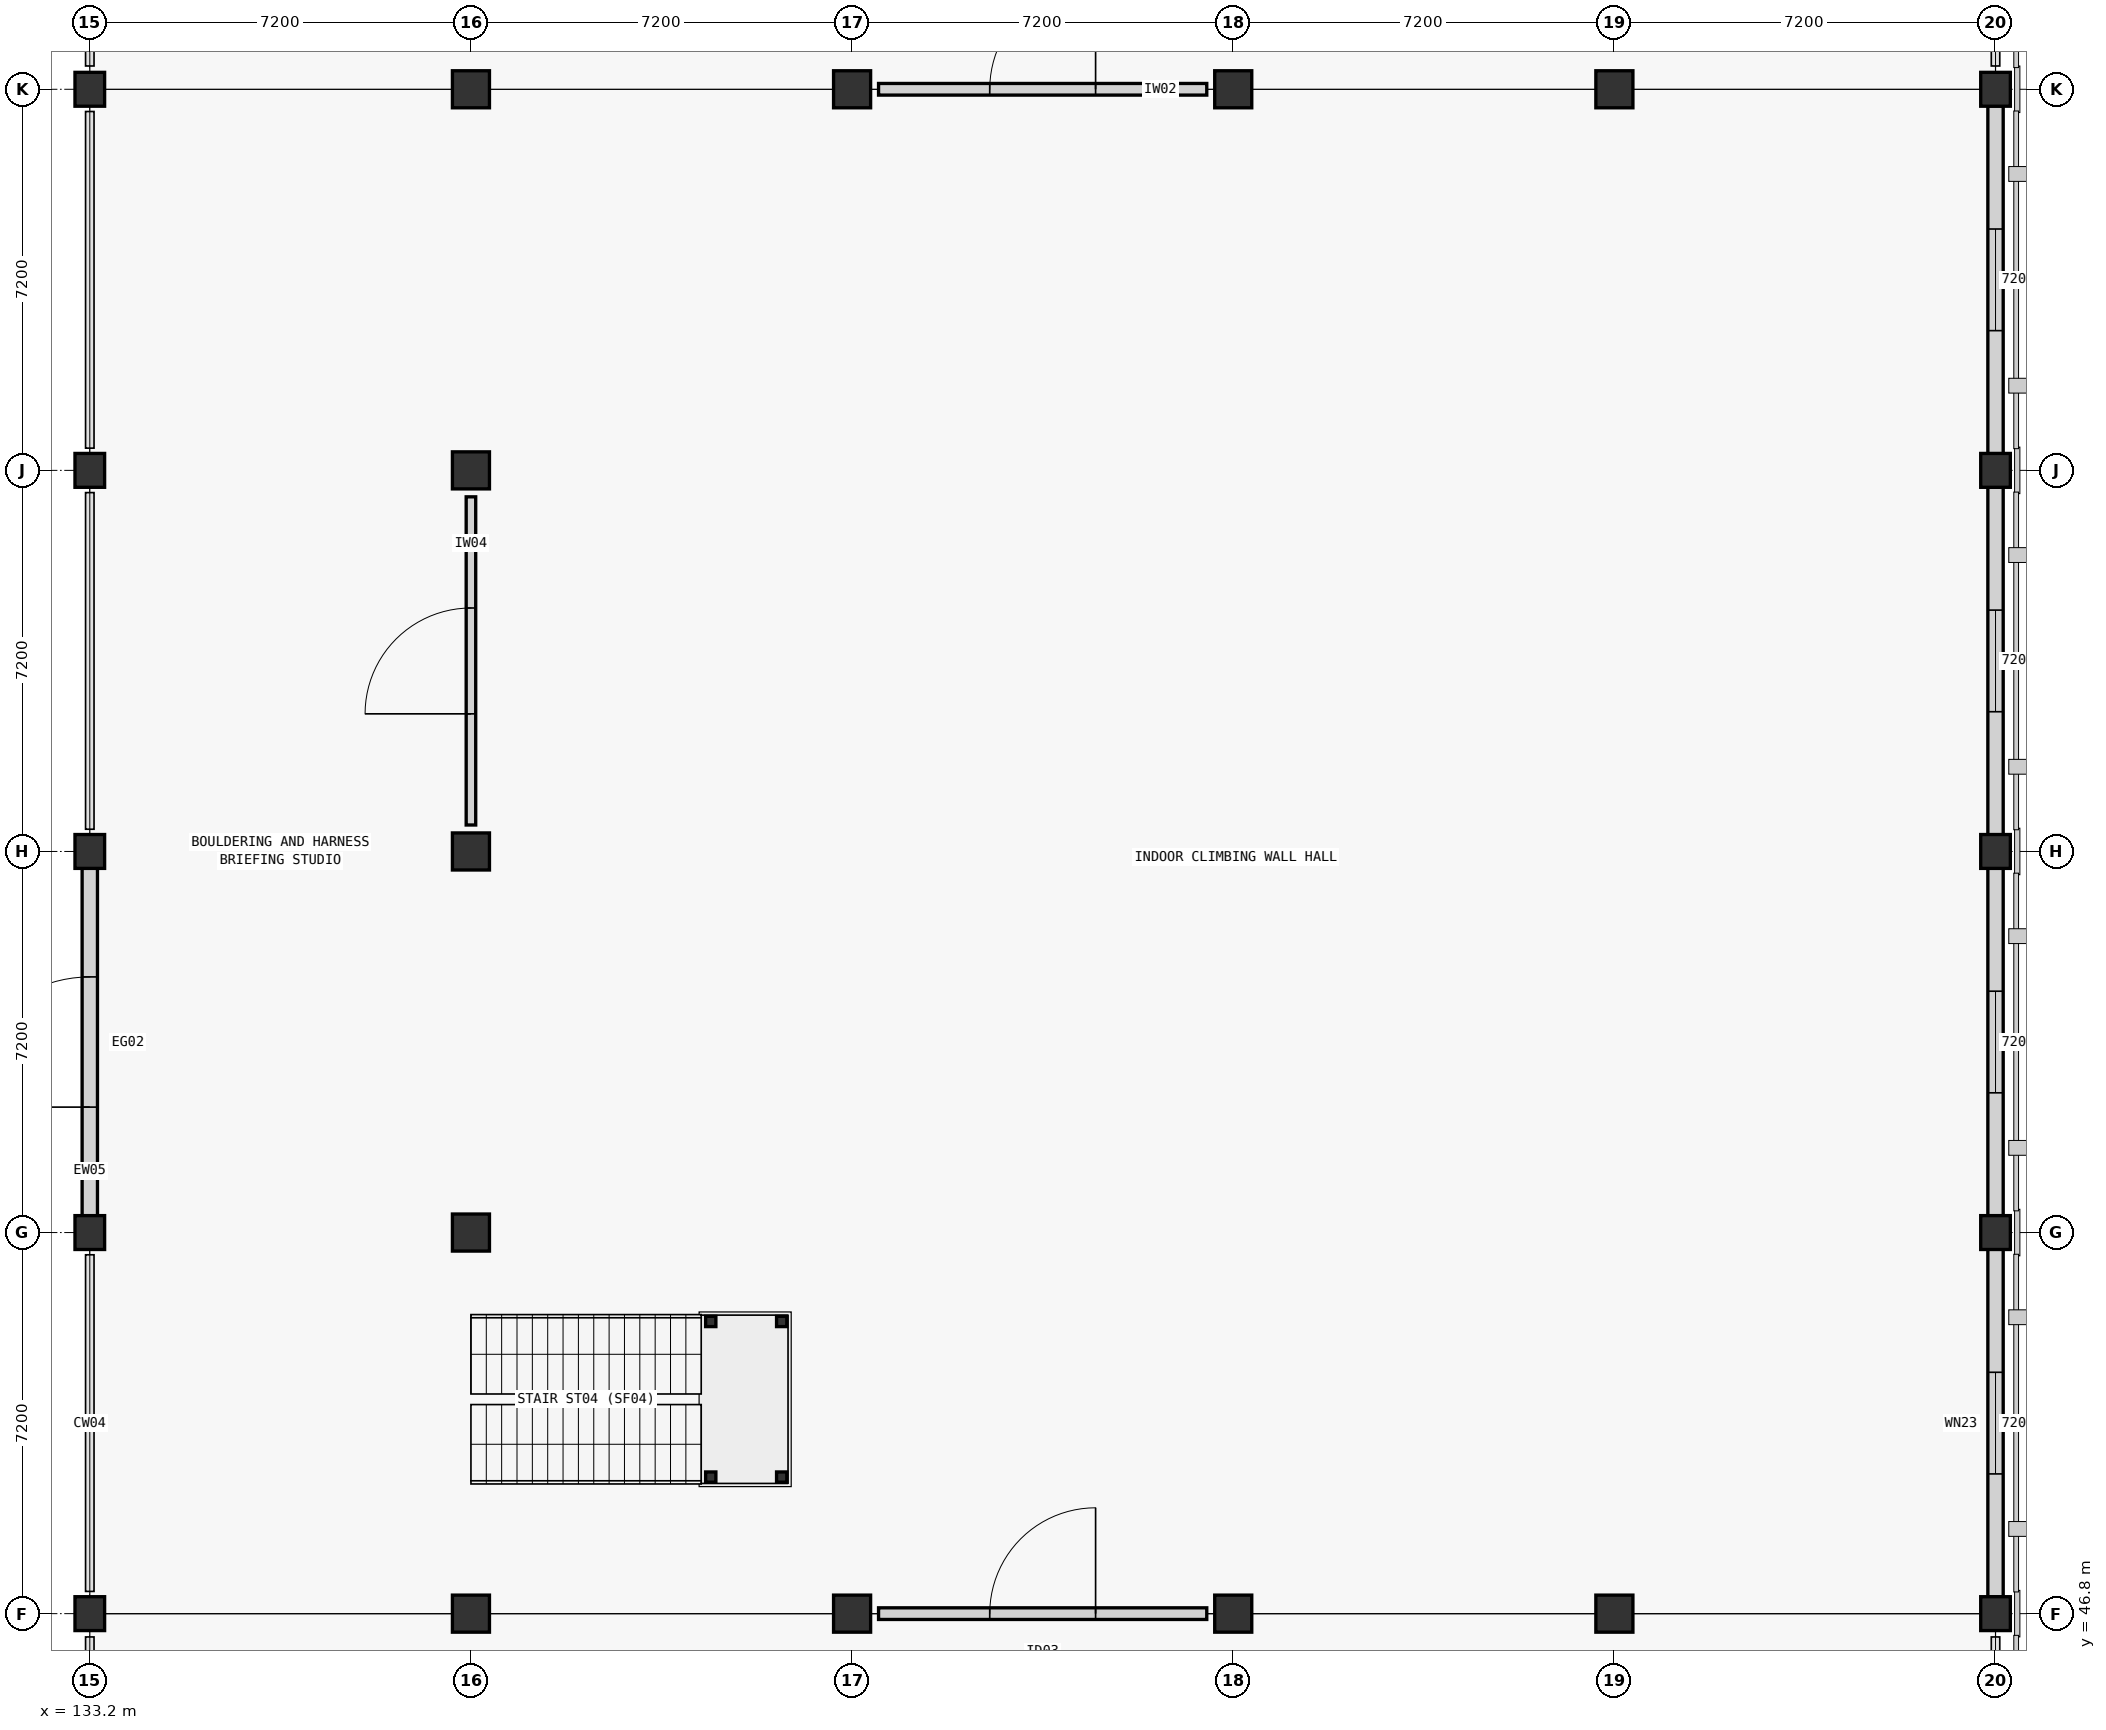
"""IFC4 building model, lengths in metres.
Left out: names, types, materials, properties, quantities, classifications, styles, units other than length and angle.
Written with IfcOpenShell. Run it as: python <this file> out.ifc"""

import sys

from ifc_helpers import new_model, si_unit, direction, frame, frame_2d, origin, origin_2d, place, context, subcontext, project, spatial, rectangle, hollow_circle, extrude, element, fill, save


model = new_model("IFC4")
c1 = context("Model", 3, precision=1e-05, world=origin(), true_north=direction((0.0, 1.0)))
c2 = subcontext(c1, "Body", "Model", "MODEL_VIEW")
j1 = project(units=[si_unit("LENGTHUNIT", "METRE"), si_unit("PLANEANGLEUNIT", "RADIAN")], contexts=[c1])
p1 = place(None, origin())
s1 = spatial("IfcSite", under=j1, at=p1, CompositionType="ELEMENT")
p2 = place(p1, origin())
s2 = spatial("IfcBuilding", under=s1, at=p2, CompositionType="ELEMENT")
p3 = place(p2, origin())
s3 = spatial("IfcBuildingStorey", under=s2, at=p3, CompositionType="ELEMENT", Elevation=0.0)
for number, where, z_axis, x_axis in (
    (1, (133.2, 46.8, -0.3), (0.0, 0.0, 1.0), (1.0, 0.0, 0.0)),
    (2, (133.2, 54.0, -0.3), (0.0, 0.0, 1.0), (1.0, 0.0, 0.0)),
    (3, (133.2, 61.2, -0.3), (0.0, 0.0, 1.0), (1.0, 0.0, 0.0)),
    (4, (133.2, 68.4, -0.3), (0.0, 0.0, 1.0), (1.0, 0.0, 0.0)),
    (5, (133.2, 75.6, -0.3), (0.0, 0.0, 1.0), (1.0, 0.0, 0.0)),
):
    element("IfcColumn", number, at=place(p3, frame(where, z_axis=z_axis, x_axis=x_axis)), inside=s3, PredefinedType="COLUMN", context=c2, shape_type="SweptSolid", body=[
        extrude(rectangle(XDim=0.56, YDim=0.64, at=origin_2d()), origin(), (0.0, 0.0, 1.0), 5.7),
    ])
for number, where, z_axis, x_axis in (
    (6, (140.4, 46.8, -0.3), (0.0, 0.0, 1.0), (1.0, 0.0, 0.0)),
    (7, (140.4, 54.0, -0.3), (0.0, 0.0, 1.0), (1.0, 0.0, 0.0)),
    (8, (140.4, 61.2, -0.3), (0.0, 0.0, 1.0), (1.0, 0.0, 0.0)),
    (9, (140.4, 68.4, -0.3), (0.0, 0.0, 1.0), (1.0, 0.0, 0.0)),
    (10, (140.4, 75.6, -0.3), (0.0, 0.0, 1.0), (1.0, 0.0, 0.0)),
    (11, (147.6, 46.8, -0.3), (0.0, 0.0, 1.0), (1.0, 0.0, 0.0)),
    (12, (147.6, 75.6, -0.3), (0.0, 0.0, 1.0), (1.0, 0.0, 0.0)),
    (13, (154.8, 46.8, -0.3), (0.0, 0.0, 1.0), (1.0, 0.0, 0.0)),
    (14, (154.8, 75.6, -0.3), (0.0, 0.0, 1.0), (1.0, 0.0, 0.0)),
    (15, (162.0, 46.8, -0.3), (0.0, 0.0, 1.0), (1.0, 0.0, 0.0)),
    (16, (162.0, 75.6, -0.3), (0.0, 0.0, 1.0), (1.0, 0.0, 0.0)),
):
    element("IfcColumn", number, at=place(p3, frame(where, z_axis=z_axis, x_axis=x_axis)), inside=s3, PredefinedType="COLUMN", context=c2, shape_type="SweptSolid", body=[
        extrude(rectangle(XDim=0.7, YDim=0.7, at=origin_2d()), origin(), (0.0, 0.0, 1.0), 5.7),
    ])
for number, where, z_axis, x_axis in (
    (17, (169.2, 46.8, -0.3), (0.0, 0.0, 1.0), (1.0, 0.0, 0.0)),
    (18, (169.2, 54.0, -0.3), (0.0, 0.0, 1.0), (1.0, 0.0, 0.0)),
    (19, (169.2, 61.2, -0.3), (0.0, 0.0, 1.0), (1.0, 0.0, 0.0)),
    (20, (169.2, 68.4, -0.3), (0.0, 0.0, 1.0), (1.0, 0.0, 0.0)),
    (21, (169.2, 75.6, -0.3), (0.0, 0.0, 1.0), (1.0, 0.0, 0.0)),
):
    element("IfcColumn", number, at=place(p3, frame(where, z_axis=z_axis, x_axis=x_axis)), inside=s3, PredefinedType="COLUMN", context=c2, shape_type="SweptSolid", body=[
        extrude(rectangle(XDim=0.56, YDim=0.64, at=origin_2d()), origin(), (0.0, 0.0, 1.0), 5.7),
    ])
p4 = place(p3, frame((169.2, 53.684, 0.0), z_axis=(0.0, 0.0, 1.0), x_axis=(0.0, -1.0, 0.0)))
e22 = element("IfcWall", 22, at=p4, inside=s3, PredefinedType="STANDARD", context=c2, shape_type="SweptSolid", body=[
    extrude(rectangle(XDim=6.568, YDim=0.29, at=frame_2d((3.284, 0.0))), origin(), (0.0, 0.0, 1.0), 4.7),
])
p5 = place(p4, frame((2.324, 0.0, 0.9)))
e23 = element("IfcOpeningElement", 23, at=p5, cuts=e22, PredefinedType="OPENING", context=c2, shape_type="SweptSolid", body=[
    extrude(rectangle(XDim=1.92, YDim=2.62, at=frame_2d((0.96, 1.31))), frame((0.0, 0.145, 0.0), z_axis=(0.0, -1.0, 0.0), x_axis=(1.0, 0.0, 0.0)), (0.0, 0.0, 1.0), 0.29),
])
p6 = place(p3, frame((133.2, 54.316, 0.0), z_axis=(0.0, 0.0, 1.0), x_axis=(0.0, 1.0, 0.0)))
e24 = element("IfcWall", 24, at=p6, inside=s3, PredefinedType="STANDARD", context=c2, shape_type="SweptSolid", body=[
    extrude(rectangle(XDim=6.568, YDim=0.29, at=frame_2d((3.284, 0.0))), origin(), (0.0, 0.0, 1.0), 4.515),
])
p7 = place(p6, frame((2.054, 0.0, 0.0)))
e25 = element("IfcOpeningElement", 25, at=p7, cuts=e24, PredefinedType="OPENING", context=c2, shape_type="SweptSolid", body=[
    extrude(rectangle(XDim=2.46, YDim=2.34, at=frame_2d((1.23, 1.17))), frame((0.0, 0.145, 0.0), z_axis=(0.0, -1.0, 0.0), x_axis=(1.0, 0.0, 0.0)), (0.0, 0.0, 1.0), 0.29),
])
p8 = place(p3, frame((169.2, 60.884, 0.0), z_axis=(0.0, 0.0, 1.0), x_axis=(0.0, -1.0, 0.0)))
e26 = element("IfcWall", 26, at=p8, inside=s3, PredefinedType="STANDARD", context=c2, shape_type="SweptSolid", body=[
    extrude(rectangle(XDim=6.568, YDim=0.29, at=frame_2d((3.284, 0.0))), origin(), (0.0, 0.0, 1.0), 4.7),
])
p9 = place(p8, frame((2.324, 0.0, 0.9)))
e27 = element("IfcOpeningElement", 27, at=p9, cuts=e26, PredefinedType="OPENING", context=c2, shape_type="SweptSolid", body=[
    extrude(rectangle(XDim=1.92, YDim=2.62, at=frame_2d((0.96, 1.31))), frame((0.0, 0.145, 0.0), z_axis=(0.0, -1.0, 0.0), x_axis=(1.0, 0.0, 0.0)), (0.0, 0.0, 1.0), 0.29),
])
p10 = place(p3, frame((169.2, 68.084, 0.0), z_axis=(0.0, 0.0, 1.0), x_axis=(0.0, -1.0, 0.0)))
e28 = element("IfcWall", 28, at=p10, inside=s3, PredefinedType="STANDARD", context=c2, shape_type="SweptSolid", body=[
    extrude(rectangle(XDim=6.568, YDim=0.29, at=frame_2d((3.284, 0.0))), origin(), (0.0, 0.0, 1.0), 4.7),
])
p11 = place(p10, frame((2.324, 0.0, 0.9)))
e29 = element("IfcOpeningElement", 29, at=p11, cuts=e28, PredefinedType="OPENING", context=c2, shape_type="SweptSolid", body=[
    extrude(rectangle(XDim=1.92, YDim=2.62, at=frame_2d((0.96, 1.31))), frame((0.0, 0.145, 0.0), z_axis=(0.0, -1.0, 0.0), x_axis=(1.0, 0.0, 0.0)), (0.0, 0.0, 1.0), 0.29),
])
p12 = place(p3, frame((169.2, 75.284, 0.0), z_axis=(0.0, 0.0, 1.0), x_axis=(0.0, -1.0, 0.0)))
e30 = element("IfcWall", 30, at=p12, inside=s3, PredefinedType="STANDARD", context=c2, shape_type="SweptSolid", body=[
    extrude(rectangle(XDim=6.568, YDim=0.29, at=frame_2d((3.284, 0.0))), origin(), (0.0, 0.0, 1.0), 4.7),
])
p13 = place(p12, frame((2.324, 0.0, 0.9)))
e31 = element("IfcOpeningElement", 31, at=p13, cuts=e30, PredefinedType="OPENING", context=c2, shape_type="SweptSolid", body=[
    extrude(rectangle(XDim=1.92, YDim=2.62, at=frame_2d((0.96, 1.31))), frame((0.0, 0.145, 0.0), z_axis=(0.0, -1.0, 0.0), x_axis=(1.0, 0.0, 0.0)), (0.0, 0.0, 1.0), 0.29),
])
for number, where, z_axis, x_axis in (
    (32, (144.93, 49.38, -0.3), (0.0, 0.0, 1.0), (1.0, 0.0, 0.0)),
    (33, (146.27, 49.38, -0.3), (0.0, 0.0, 1.0), (1.0, 0.0, 0.0)),
    (34, (144.93, 52.32, -0.3), (0.0, 0.0, 1.0), (1.0, 0.0, 0.0)),
    (35, (146.27, 52.32, -0.3), (0.0, 0.0, 1.0), (1.0, 0.0, 0.0)),
):
    element("IfcColumn", number, at=place(p3, frame(where, z_axis=z_axis, x_axis=x_axis)), inside=s3, PredefinedType="COLUMN", context=c2, shape_type="SweptSolid", body=[
        extrude(hollow_circle(Radius=0.097, WallThickness=0.01, at=origin_2d()), origin(), (0.0, 0.0, 1.0), 2.782),
    ])
p14 = place(p3, frame((148.1, 46.8, 0.0), z_axis=(0.0, 0.0, 1.0), x_axis=(1.0, 0.0, 0.0)))
e36 = element("IfcWall", 36, at=p14, inside=s3, PredefinedType="STANDARD", context=c2, shape_type="SweptSolid", body=[
    extrude(rectangle(XDim=6.2, YDim=0.22, at=frame_2d((3.1, 0.0))), origin(), (0.0, 0.0, 1.0), 4.2),
])
p15 = place(p14, frame((2.1, 0.0, 0.0)))
e37 = element("IfcOpeningElement", 37, at=p15, cuts=e36, PredefinedType="OPENING", context=c2, shape_type="SweptSolid", body=[
    extrude(rectangle(XDim=2.0, YDim=2.42, at=frame_2d((1.0, 1.21))), frame((0.0, 0.11, 0.0), z_axis=(0.0, -1.0, 0.0), x_axis=(1.0, 0.0, 0.0)), (0.0, 0.0, 1.0), 0.22),
])
p16 = place(p3, frame((140.4, 61.7, 0.0), z_axis=(0.0, 0.0, 1.0), x_axis=(0.0, 1.0, 0.0)))
e38 = element("IfcWall", 38, at=p16, inside=s3, PredefinedType="STANDARD", context=c2, shape_type="SweptSolid", body=[
    extrude(rectangle(XDim=6.2, YDim=0.18, at=frame_2d((3.1, 0.0))), origin(), (0.0, 0.0, 1.0), 4.2),
])
p17 = place(p16, frame((2.1, 0.0, 0.0)))
e39 = element("IfcOpeningElement", 39, at=p17, cuts=e38, PredefinedType="OPENING", context=c2, shape_type="SweptSolid", body=[
    extrude(rectangle(XDim=2.0, YDim=2.42, at=frame_2d((1.0, 1.21))), frame((0.0, 0.09, 0.0), z_axis=(0.0, -1.0, 0.0), x_axis=(1.0, 0.0, 0.0)), (0.0, 0.0, 1.0), 0.18),
])
p18 = place(p3, frame((148.1, 75.6, 0.0), z_axis=(0.0, 0.0, 1.0), x_axis=(1.0, 0.0, 0.0)))
e40 = element("IfcWall", 40, at=p18, inside=s3, PredefinedType="STANDARD", context=c2, shape_type="SweptSolid", body=[
    extrude(rectangle(XDim=6.2, YDim=0.22, at=frame_2d((3.1, 0.0))), origin(), (0.0, 0.0, 1.0), 4.2),
])
p19 = place(p18, frame((2.1, 0.0, 0.0)))
e41 = element("IfcOpeningElement", 41, at=p19, cuts=e40, PredefinedType="OPENING", context=c2, shape_type="SweptSolid", body=[
    extrude(rectangle(XDim=2.0, YDim=2.42, at=frame_2d((1.0, 1.21))), frame((0.0, 0.11, 0.0), z_axis=(0.0, -1.0, 0.0), x_axis=(1.0, 0.0, 0.0)), (0.0, 0.0, 1.0), 0.22),
])
p20 = place(p5, origin())
e42 = element("IfcWindow", 42, at=p20, inside=s3, PartitioningType="SINGLE_PANEL", PredefinedType="WINDOW", context=c2, shape_type="SweptSolid", body=[
    extrude(rectangle(XDim=1.92, YDim=2.62, at=frame_2d((0.96, 1.31))), frame((0.0, 0.03, 0.0), z_axis=(0.0, -1.0, 0.0), x_axis=(1.0, 0.0, 0.0)), (0.0, 0.0, 1.0), 0.06),
])
fill(e23, e42)
p21 = place(p7, origin())
e43 = element("IfcDoor", 43, at=p21, inside=s3, OperationType="SINGLE_SWING_LEFT", PredefinedType="GATE", context=c2, shape_type="SweptSolid", body=[
    extrude(rectangle(XDim=2.46, YDim=2.34, at=frame_2d((1.23, 1.17))), frame((0.0, 0.025, 0.0), z_axis=(0.0, -1.0, 0.0), x_axis=(1.0, 0.0, 0.0)), (0.0, 0.0, 1.0), 0.05),
])
fill(e25, e43)
p22 = place(p9, origin())
e44 = element("IfcWindow", 44, at=p22, inside=s3, PartitioningType="SINGLE_PANEL", PredefinedType="WINDOW", context=c2, shape_type="SweptSolid", body=[
    extrude(rectangle(XDim=1.92, YDim=2.62, at=frame_2d((0.96, 1.31))), frame((0.0, 0.03, 0.0), z_axis=(0.0, -1.0, 0.0), x_axis=(1.0, 0.0, 0.0)), (0.0, 0.0, 1.0), 0.06),
])
fill(e27, e44)
p23 = place(p11, origin())
e45 = element("IfcWindow", 45, at=p23, inside=s3, PartitioningType="SINGLE_PANEL", PredefinedType="WINDOW", context=c2, shape_type="SweptSolid", body=[
    extrude(rectangle(XDim=1.92, YDim=2.62, at=frame_2d((0.96, 1.31))), frame((0.0, 0.03, 0.0), z_axis=(0.0, -1.0, 0.0), x_axis=(1.0, 0.0, 0.0)), (0.0, 0.0, 1.0), 0.06),
])
fill(e29, e45)
p24 = place(p13, origin())
e46 = element("IfcWindow", 46, at=p24, inside=s3, PartitioningType="SINGLE_PANEL", PredefinedType="WINDOW", context=c2, shape_type="SweptSolid", body=[
    extrude(rectangle(XDim=1.92, YDim=2.62, at=frame_2d((0.96, 1.31))), frame((0.0, 0.03, 0.0), z_axis=(0.0, -1.0, 0.0), x_axis=(1.0, 0.0, 0.0)), (0.0, 0.0, 1.0), 0.06),
])
fill(e31, e46)
p25 = place(p15, origin())
e47 = element("IfcDoor", 47, at=p25, inside=s3, OperationType="SINGLE_SWING_RIGHT", PredefinedType="DOOR", context=c2, shape_type="SweptSolid", body=[
    extrude(rectangle(XDim=2.0, YDim=2.42, at=frame_2d((1.0, 1.21))), frame((0.0, 0.025, 0.0), z_axis=(0.0, -1.0, 0.0), x_axis=(1.0, 0.0, 0.0)), (0.0, 0.0, 1.0), 0.05),
])
fill(e37, e47)
p26 = place(p17, origin())
e48 = element("IfcDoor", 48, at=p26, inside=s3, OperationType="SINGLE_SWING_LEFT", PredefinedType="DOOR", context=c2, shape_type="SweptSolid", body=[
    extrude(rectangle(XDim=2.0, YDim=2.42, at=frame_2d((1.0, 1.21))), frame((0.0, 0.025, 0.0), z_axis=(0.0, -1.0, 0.0), x_axis=(1.0, 0.0, 0.0)), (0.0, 0.0, 1.0), 0.05),
])
fill(e39, e48)
p27 = place(p19, origin())
e49 = element("IfcDoor", 49, at=p27, inside=s3, OperationType="SINGLE_SWING_RIGHT", PredefinedType="DOOR", context=c2, shape_type="SweptSolid", body=[
    extrude(rectangle(XDim=2.0, YDim=2.42, at=frame_2d((1.0, 1.21))), frame((0.0, 0.025, 0.0), z_axis=(0.0, -1.0, 0.0), x_axis=(1.0, 0.0, 0.0)), (0.0, 0.0, 1.0), 0.05),
])
fill(e41, e49)
save(model, sys.argv[1])
